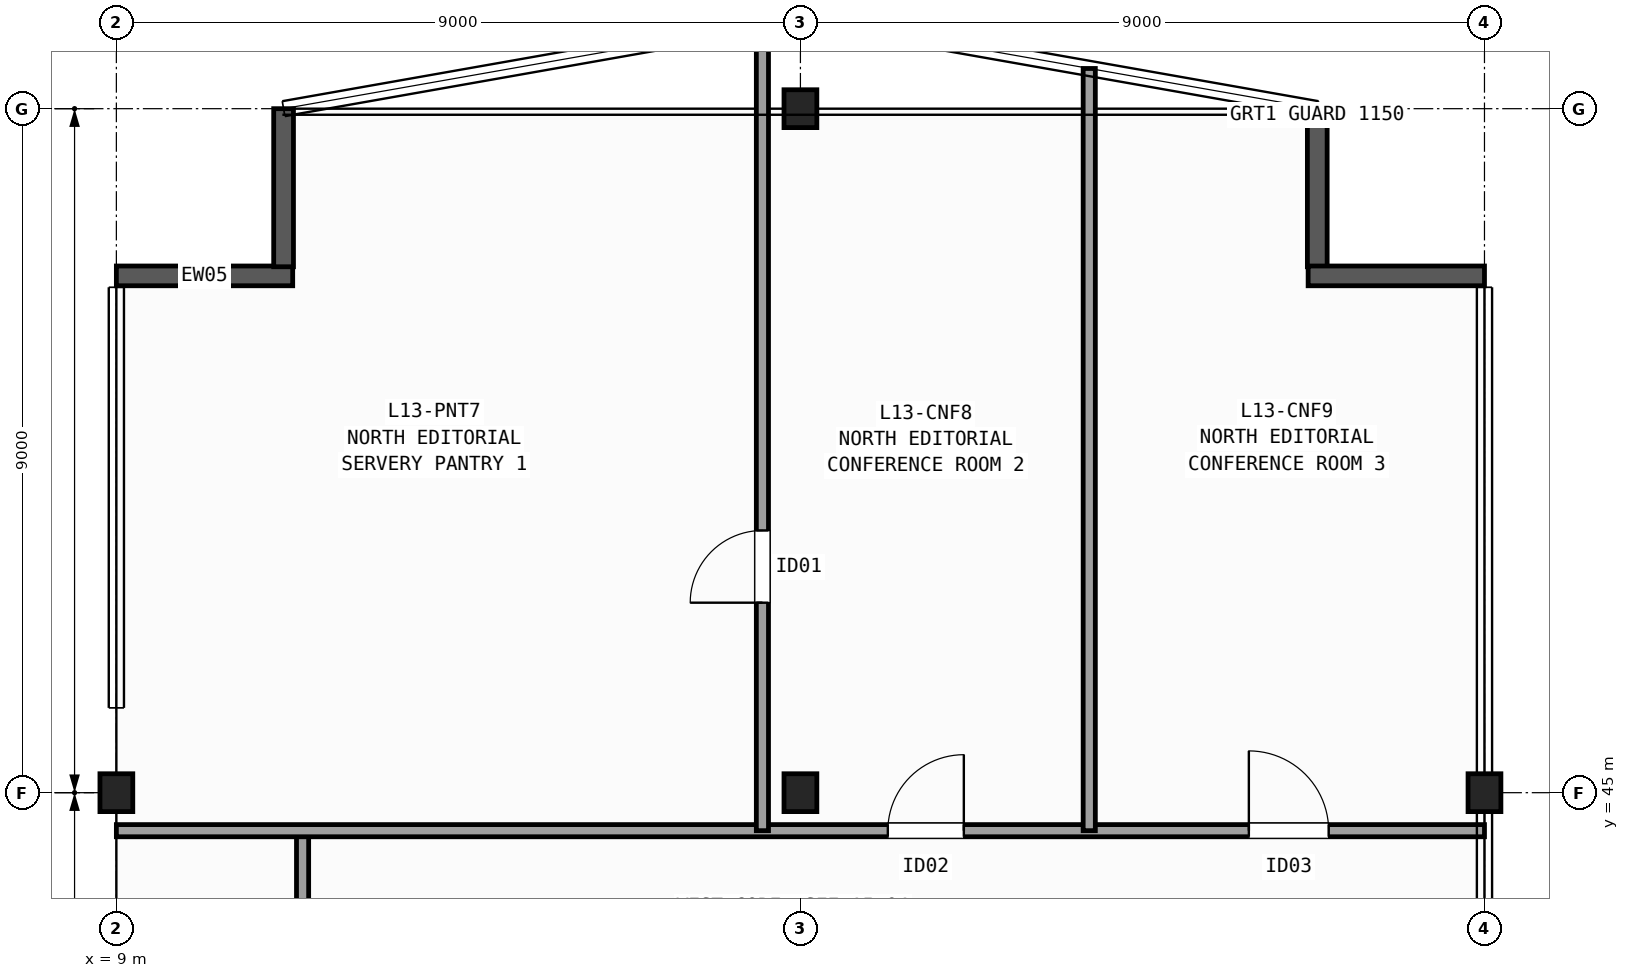
"""IFC4 building model, lengths in metres.
Left out: names, types, materials, properties, quantities, classifications, styles, units other than length and angle.
Written with IfcOpenShell. Run it as: python <this file> out.ifc"""

import sys

from ifc_helpers import new_model, si_unit, direction, frame, frame_2d, origin, origin_2d, place, context, subcontext, project, spatial, rectangle, i_section, extrude, element, fill, save


model = new_model("IFC4")
c1 = context("Model", 3, precision=1e-05, world=origin(), true_north=direction((0.0, 1.0)))
c2 = subcontext(c1, "Body", "Model", "MODEL_VIEW")
j1 = project(units=[si_unit("LENGTHUNIT", "METRE"), si_unit("PLANEANGLEUNIT", "RADIAN")], contexts=[c1])
p1 = place(None, origin())
s1 = spatial("IfcSite", under=j1, at=p1, CompositionType="ELEMENT")
p2 = place(p1, origin())
s2 = spatial("IfcBuilding", under=s1, at=p2, CompositionType="ELEMENT")
p3 = place(p2, frame((0.0, 0.0, 58.2)))
s3 = spatial("IfcBuildingStorey", under=s2, at=p3, CompositionType="ELEMENT", Elevation=58.2)
for number, where, z_axis, x_axis in (
    (1, (9.0, 45.0, 0.0), (0.0, 0.0, 1.0), (1.0, 0.0, 0.0)),
    (2, (18.0, 45.0, 0.0), (0.0, 0.0, 1.0), (1.0, 0.0, 0.0)),
    (3, (18.0, 54.0, 0.0), (0.0, 0.0, 1.0), (1.0, 0.0, 0.0)),
    (4, (27.0, 45.0, 0.0), (0.0, 0.0, 1.0), (1.0, 0.0, 0.0)),
):
    element("IfcColumn", number, at=place(p3, frame(where, z_axis=z_axis, x_axis=x_axis)), inside=s3, PredefinedType="COLUMN", context=c2, shape_type="SweptSolid", body=[
        extrude(i_section(OverallWidth=0.432, OverallDepth=0.498, WebThickness=0.056, FlangeThickness=0.089, FilletRadius=0.015, at=origin_2d()), origin(), (0.0, 0.0, 1.0), 3.7),
    ])
p4 = place(p3, frame((9.0, 51.8, 0.0), z_axis=(0.0, 0.0, 1.0), x_axis=(1.0, 0.0, 0.0)))
e5 = element("IfcWall", 5, at=p4, inside=s3, PredefinedType="SOLIDWALL", context=c2, shape_type="SweptSolid", body=[
    extrude(rectangle(XDim=2.32, YDim=0.26, at=frame_2d((1.16, 0.0))), origin(), (0.0, 0.0, 1.0), 3.42),
])
for number, where, z_axis, x_axis in (
    (6, (11.2, 51.92, 0.0), (0.0, 0.0, 1.0), (0.0, 1.0, 0.0)),
    (7, (24.8, 54.0, 0.0), (0.0, 0.0, 1.0), (0.0, -1.0, 0.0)),
):
    element("IfcWall", number, at=place(p3, frame(where, z_axis=z_axis, x_axis=x_axis)), inside=s3, PredefinedType="SOLIDWALL", context=c2, shape_type="SweptSolid", body=[
        extrude(rectangle(XDim=2.08, YDim=0.26, at=frame_2d((1.04, 0.0))), origin(), (0.0, 0.0, 1.0), 3.42),
    ])
p5 = place(p3, frame((24.68, 51.8, 0.0), z_axis=(0.0, 0.0, 1.0), x_axis=(1.0, 0.0, 0.0)))
e8 = element("IfcWall", 8, at=p5, inside=s3, PredefinedType="SOLIDWALL", context=c2, shape_type="SweptSolid", body=[
    extrude(rectangle(XDim=2.32, YDim=0.26, at=frame_2d((1.16, 0.0))), origin(), (0.0, 0.0, 1.0), 3.42),
])
p6 = place(p3, frame((11.45, 42.4, 0.0), z_axis=(0.0, 0.0, 1.0), x_axis=(0.0, 1.0, 0.0)))
e9 = element("IfcWall", 9, at=p6, inside=s3, PredefinedType="PARTITIONING", context=c2, shape_type="SweptSolid", body=[
    extrude(rectangle(XDim=2.1, YDim=0.16, at=frame_2d((1.05, 0.0))), origin(), (0.0, 0.0, 1.0), 3.42),
])
p7 = place(p3, frame((9.0, 44.5, 0.0), z_axis=(0.0, 0.0, 1.0), x_axis=(1.0, 0.0, 0.0)))
e10 = element("IfcWall", 10, at=p7, inside=s3, PredefinedType="PARTITIONING", context=c2, shape_type="SweptSolid", body=[
    extrude(rectangle(XDim=18.0, YDim=0.16, at=frame_2d((9.0, 0.0))), origin(), (0.0, 0.0, 1.0), 2.627),
])
p8 = place(p7, frame((10.15, 0.0, 0.0)))
e11 = element("IfcOpeningElement", 11, at=p8, cuts=e10, PredefinedType="OPENING", context=c2, shape_type="SweptSolid", body=[
    extrude(rectangle(XDim=1.0, YDim=2.1, at=frame_2d((0.5, 1.05))), frame((0.0, 0.09, 0.0), z_axis=(0.0, -1.0, 0.0), x_axis=(1.0, 0.0, 0.0)), (0.0, 0.0, 1.0), 0.18),
])
p9 = place(p7, frame((14.9, 0.0, 0.0)))
e12 = element("IfcOpeningElement", 12, at=p9, cuts=e10, PredefinedType="OPENING", context=c2, shape_type="SweptSolid", body=[
    extrude(rectangle(XDim=1.05, YDim=2.15, at=frame_2d((0.525, 1.075))), frame((0.0, 0.09, 0.0), z_axis=(0.0, -1.0, 0.0), x_axis=(1.0, 0.0, 0.0)), (0.0, 0.0, 1.0), 0.18),
])
p10 = place(p3, frame((17.5, 44.5, 0.0), z_axis=(0.0, 0.0, 1.0), x_axis=(0.0, 1.0, 0.0)))
e13 = element("IfcWall", 13, at=p10, inside=s3, PredefinedType="PARTITIONING", context=c2, shape_type="SweptSolid", body=[
    extrude(rectangle(XDim=10.612, YDim=0.16, at=frame_2d((5.306, 0.0))), origin(), (0.0, 0.0, 1.0), 3.42),
])
p11 = place(p10, frame((3.0, 0.0, 0.0)))
e14 = element("IfcOpeningElement", 14, at=p11, cuts=e13, PredefinedType="OPENING", context=c2, shape_type="SweptSolid", body=[
    extrude(rectangle(XDim=0.95, YDim=2.1, at=frame_2d((0.475, 1.05))), frame((0.0, 0.09, 0.0), z_axis=(0.0, -1.0, 0.0), x_axis=(1.0, 0.0, 0.0)), (0.0, 0.0, 1.0), 0.18),
])
p12 = place(p3, frame((21.8, 44.5, 0.0), z_axis=(0.0, 0.0, 1.0), x_axis=(0.0, 1.0, 0.0)))
e15 = element("IfcWall", 15, at=p12, inside=s3, PredefinedType="PARTITIONING", context=c2, shape_type="SweptSolid", body=[
    extrude(rectangle(XDim=10.029, YDim=0.16, at=frame_2d((5.015, 0.0))), origin(), (0.0, 0.0, 1.0), 3.42),
])
p13 = place(p11, origin())
e16 = element("IfcDoor", 16, at=p13, inside=s3, OperationType="SINGLE_SWING_LEFT", PredefinedType="DOOR", context=c2, shape_type="SweptSolid", body=[
    extrude(rectangle(XDim=0.95, YDim=2.1, at=frame_2d((0.475, 1.05))), frame((0.0, 0.025, 0.0), z_axis=(0.0, -1.0, 0.0), x_axis=(1.0, 0.0, 0.0)), (0.0, 0.0, 1.0), 0.05),
])
fill(e14, e16)
p14 = place(p8, origin())
e17 = element("IfcDoor", 17, at=p14, inside=s3, OperationType="SINGLE_SWING_RIGHT", PredefinedType="DOOR", context=c2, shape_type="SweptSolid", body=[
    extrude(rectangle(XDim=1.0, YDim=2.1, at=frame_2d((0.5, 1.05))), frame((0.0, 0.025, 0.0), z_axis=(0.0, -1.0, 0.0), x_axis=(1.0, 0.0, 0.0)), (0.0, 0.0, 1.0), 0.05),
])
fill(e11, e17)
p15 = place(p9, origin())
e18 = element("IfcDoor", 18, at=p15, inside=s3, OperationType="SINGLE_SWING_LEFT", PredefinedType="DOOR", context=c2, shape_type="SweptSolid", body=[
    extrude(rectangle(XDim=1.05, YDim=2.15, at=frame_2d((0.525, 1.075))), frame((0.0, 0.025, 0.0), z_axis=(0.0, -1.0, 0.0), x_axis=(1.0, 0.0, 0.0)), (0.0, 0.0, 1.0), 0.05),
])
fill(e12, e18)
save(model, sys.argv[1])
